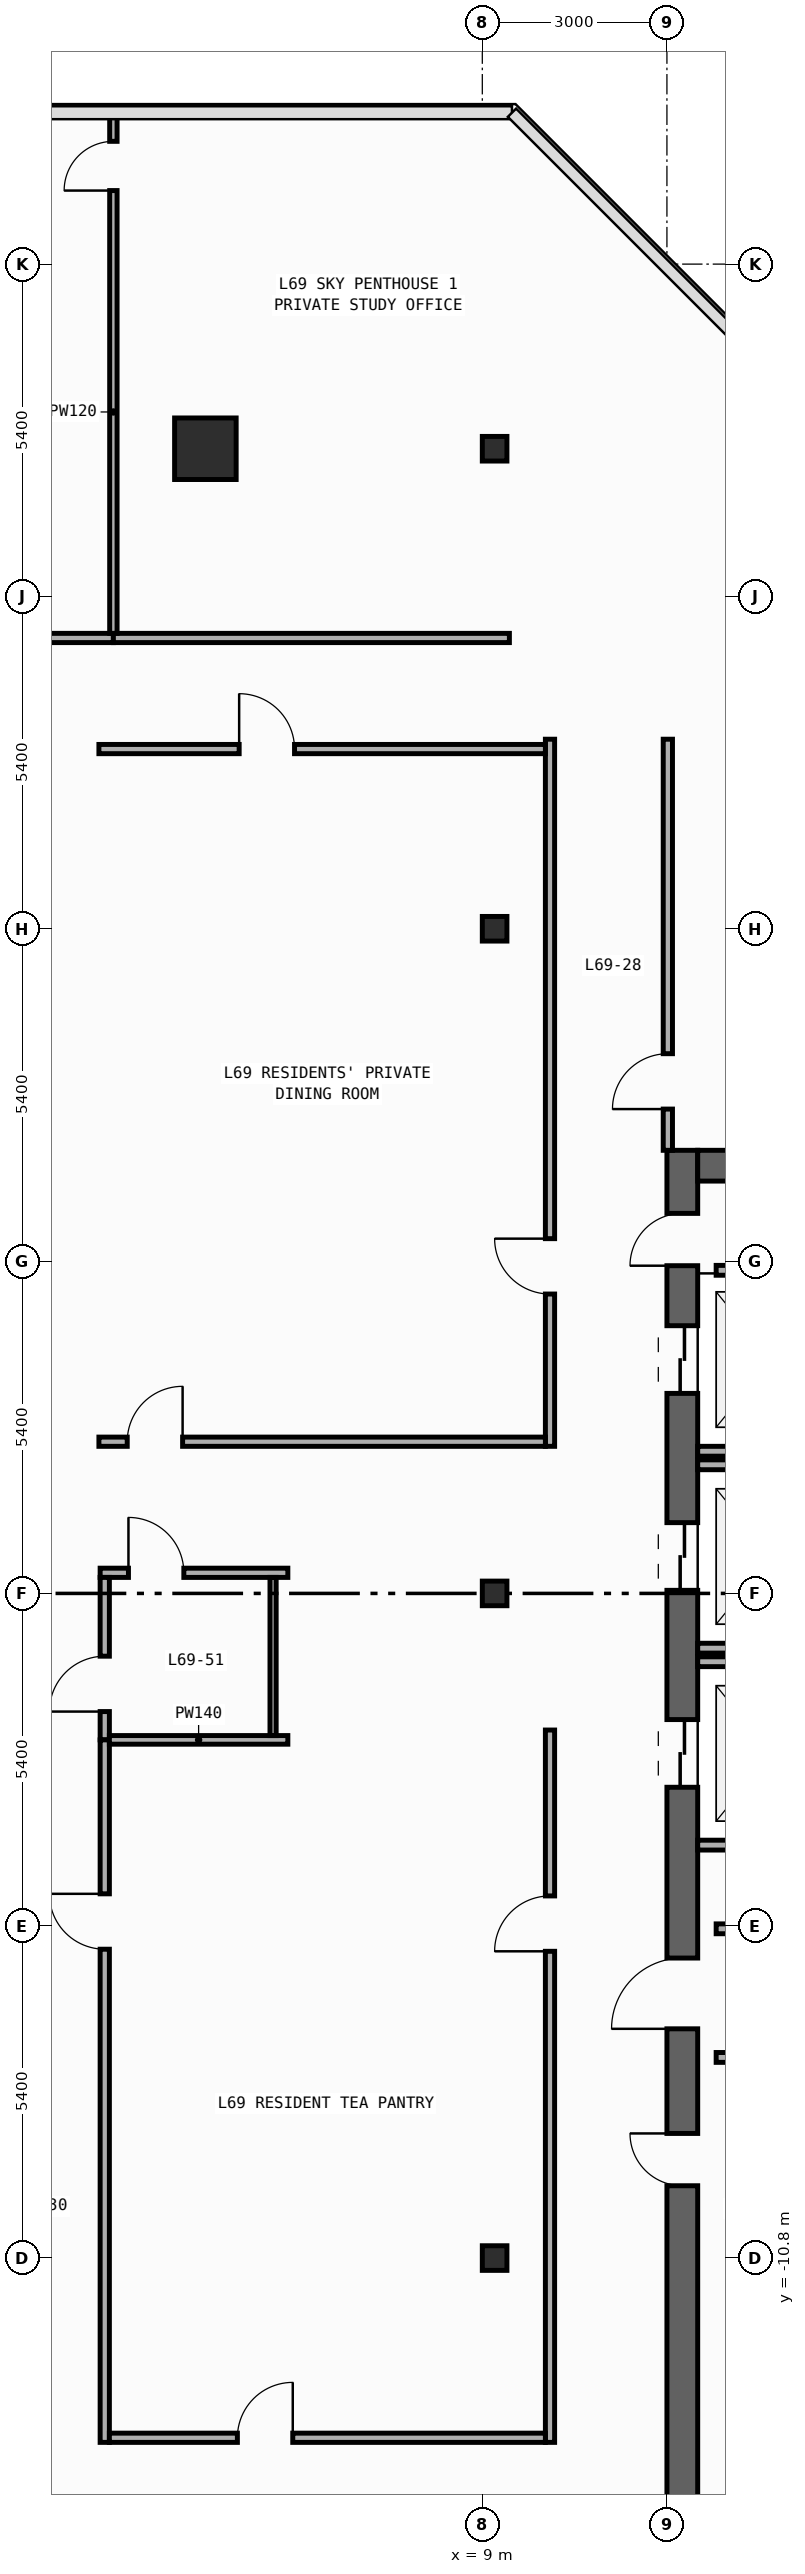
"""IFC4 building model, lengths in metres.
Left out: names, types, materials, properties, quantities, classifications, styles, units other than length and angle.
Written with IfcOpenShell. Run it as: python <this file> out.ifc"""

import sys

from ifc_helpers import new_model, si_unit, direction, frame, frame_2d, origin, origin_2d, place, context, subcontext, project, spatial, rectangle, circle, i_section, extrude, element, fill, save


model = new_model("IFC4")
c1 = context("Model", 3, precision=1e-05, world=origin(), true_north=direction((0.0, 1.0)))
c2 = subcontext(c1, "Body", "Model", "MODEL_VIEW")
j1 = project(units=[si_unit("LENGTHUNIT", "METRE"), si_unit("PLANEANGLEUNIT", "RADIAN")], contexts=[c1])
p1 = place(None, origin())
s1 = spatial("IfcSite", under=j1, at=p1, CompositionType="ELEMENT")
p2 = place(p1, origin())
s2 = spatial("IfcBuilding", under=s1, at=p2, CompositionType="ELEMENT")
p3 = place(p2, frame((0.0, 0.0, 289.0)))
s3 = spatial("IfcBuildingStorey", under=s2, at=p3, CompositionType="ELEMENT", Elevation=289.0)
p4 = place(p3, frame((12.25, -19.8, 0.0), z_axis=(0.0, 0.0, 1.0), x_axis=(0.0, 1.0, 0.0)))
e1 = element("IfcWall", 1, at=p4, inside=s3, PredefinedType="SHEAR", context=c2, shape_type="SweptSolid", body=[
    extrude(rectangle(XDim=27.0, YDim=0.5, at=frame_2d((13.5, 0.0))), origin(), (0.0, 0.0, 1.0), 3.54),
])
p5 = place(p4, frame((23.05, 0.0, 0.0)))
e2 = element("IfcOpeningElement", 2, at=p5, cuts=e1, PredefinedType="OPENING", context=c2, shape_type="SweptSolid", body=[
    extrude(rectangle(XDim=1.1, YDim=2.2, at=frame_2d((0.55, 1.1))), frame((0.0, 0.26, 0.0), z_axis=(0.0, -1.0, 0.0), x_axis=(1.0, 0.0, 0.0)), (0.0, 0.0, 1.0), 0.52),
])
p6 = place(p4, frame((19.85, 0.0, 0.0)))
e3 = element("IfcOpeningElement", 3, at=p6, cuts=e1, PredefinedType="OPENING", context=c2, shape_type="SweptSolid", body=[
    extrude(rectangle(XDim=1.1, YDim=2.2, at=frame_2d((0.55, 1.1))), frame((0.0, 0.26, 0.0), z_axis=(0.0, -1.0, 0.0), x_axis=(1.0, 0.0, 0.0)), (0.0, 0.0, 1.0), 0.52),
])
p7 = place(p4, frame((16.65, 0.0, 0.0)))
e4 = element("IfcOpeningElement", 4, at=p7, cuts=e1, PredefinedType="OPENING", context=c2, shape_type="SweptSolid", body=[
    extrude(rectangle(XDim=1.1, YDim=2.2, at=frame_2d((0.55, 1.1))), frame((0.0, 0.26, 0.0), z_axis=(0.0, -1.0, 0.0), x_axis=(1.0, 0.0, 0.0)), (0.0, 0.0, 1.0), 0.52),
])
p8 = place(p4, frame((10.175, 0.0, 0.0)))
e5 = element("IfcOpeningElement", 5, at=p8, cuts=e1, PredefinedType="OPENING", context=c2, shape_type="SweptSolid", body=[
    extrude(rectangle(XDim=0.85, YDim=2.1, at=frame_2d((0.425, 1.05))), frame((0.0, 0.26, 0.0), z_axis=(0.0, -1.0, 0.0), x_axis=(1.0, 0.0, 0.0)), (0.0, 0.0, 1.0), 0.52),
])
p9 = place(p4, frame((12.725, 0.0, 0.0)))
e6 = element("IfcOpeningElement", 6, at=p9, cuts=e1, PredefinedType="OPENING", context=c2, shape_type="SweptSolid", body=[
    extrude(rectangle(XDim=1.15, YDim=2.2, at=frame_2d((0.575, 1.1))), frame((0.0, 0.26, 0.0), z_axis=(0.0, -1.0, 0.0), x_axis=(1.0, 0.0, 0.0)), (0.0, 0.0, 1.0), 0.52),
])
p10 = place(p4, frame((25.125, 0.0, 0.0)))
e7 = element("IfcOpeningElement", 7, at=p10, cuts=e1, PredefinedType="OPENING", context=c2, shape_type="SweptSolid", body=[
    extrude(rectangle(XDim=0.85, YDim=2.1, at=frame_2d((0.425, 1.05))), frame((0.0, 0.26, 0.0), z_axis=(0.0, -1.0, 0.0), x_axis=(1.0, 0.0, 0.0)), (0.0, 0.0, 1.0), 0.52),
])
p11 = place(p3, frame((12.5, 6.95, 0.0), z_axis=(0.0, 0.0, 1.0), x_axis=(1.0, 0.0, 0.0)))
e8 = element("IfcWall", 8, at=p11, inside=s3, PredefinedType="SHEAR", context=c2, shape_type="SweptSolid", body=[
    extrude(rectangle(XDim=7.4, YDim=0.5, at=frame_2d((3.7, 0.0))), origin(), (0.0, 0.0, 1.0), 3.54),
])
for number, where, z_axis, x_axis in (
    (9, (9.2, -10.8, 0.0), (0.0, 0.0, 1.0), (1.0, 0.0, 0.0)),
    (10, (9.2, 0.0, 0.0), (0.0, 0.0, 1.0), (1.0, 0.0, 0.0)),
    (11, (9.2, 10.8, 0.0), (0.0, 0.0, 1.0), (1.0, 0.0, 0.0)),
    (12, (9.2, 18.6, 0.0), (0.0, 0.0, 1.0), (1.0, 0.0, 0.0)),
):
    element("IfcColumn", number, at=place(p3, frame(where, z_axis=z_axis, x_axis=x_axis)), inside=s3, PredefinedType="COLUMN", context=c2, shape_type="SweptSolid", body=[
        extrude(i_section(OverallWidth=0.4, OverallDepth=0.4, WebThickness=0.013, FlangeThickness=0.021, FilletRadius=0.022, at=origin_2d()), origin(), (0.0, 0.0, 1.0), 3.8),
    ])
p12 = place(p3, frame((4.5, 18.6, 0.0), z_axis=(0.0, 0.0, 1.0), x_axis=(1.0, 0.0, 0.0)))
e13 = element("IfcColumn", 13, at=p12, inside=s3, PredefinedType="COLUMN", context=c2, shape_type="SweptSolid", body=[
    extrude(circle(Radius=0.5, at=origin_2d()), origin(), (0.0, 0.0, 1.0), 3.8),
])
for number, where, z_axis, x_axis in (
    (14, (12.5, 2.31, 0.0), (0.0, 0.0, 1.0), (1.0, 0.0, 0.0)),
    (15, (12.5, -0.89, 0.0), (0.0, 0.0, 1.0), (1.0, 0.0, 0.0)),
    (16, (12.5, 2.09, 0.0), (0.0, 0.0, 1.0), (1.0, 0.0, 0.0)),
    (17, (12.5, -4.09, 0.0), (0.0, 0.0, 1.0), (1.0, 0.0, 0.0)),
    (18, (12.5, -1.11, 0.0), (0.0, 0.0, 1.0), (1.0, 0.0, 0.0)),
):
    element("IfcWall", number, at=place(p3, frame(where, z_axis=z_axis, x_axis=x_axis)), inside=s3, PredefinedType="STANDARD", context=c2, shape_type="SweptSolid", body=[
        extrude(rectangle(XDim=2.49, YDim=0.16, at=frame_2d((1.245, 0.0))), origin(), (0.0, 0.0, 1.0), 3.54),
    ])
for number, where, z_axis, x_axis in (
    (19, (12.8, -5.45, 0.0), (0.0, 0.0, 1.0), (1.0, 0.0, 0.0)),
    (20, (12.8, -7.54, 0.0), (0.0, 0.0, 1.0), (1.0, 0.0, 0.0)),
    (21, (12.8, 5.25, 0.0), (0.0, 0.0, 1.0), (1.0, 0.0, 0.0)),
):
    element("IfcWall", number, at=place(p3, frame(where, z_axis=z_axis, x_axis=x_axis)), inside=s3, PredefinedType="STANDARD", context=c2, shape_type="SweptSolid", body=[
        extrude(rectangle(XDim=2.6, YDim=0.16, at=frame_2d((1.3, 0.0))), origin(), (0.0, 0.0, 1.0), 3.54),
    ])
p13 = place(p3, frame((12.015, 7.2, 0.0), z_axis=(0.0, 0.0, 1.0), x_axis=(0.0, 1.0, 0.0)))
e22 = element("IfcWall", 22, at=p13, inside=s3, PredefinedType="PARTITIONING", context=c2, shape_type="SweptSolid", body=[
    extrude(rectangle(XDim=6.68, YDim=0.15, at=frame_2d((3.34, 0.0))), origin(), (0.0, 0.0, 1.0), 3.54),
])
p14 = place(p13, frame((0.67, 0.0, 0.0)))
e23 = element("IfcOpeningElement", 23, at=p14, cuts=e22, PredefinedType="OPENING", context=c2, shape_type="SweptSolid", body=[
    extrude(rectangle(XDim=0.9, YDim=2.15, at=frame_2d((0.45, 1.075))), frame((0.0, 0.085, 0.0), z_axis=(0.0, -1.0, 0.0), x_axis=(1.0, 0.0, 0.0)), (0.0, 0.0, 1.0), 0.17),
])
p15 = place(p3, frame((10.1, 2.39, 0.0), z_axis=(0.0, 0.0, 1.0), x_axis=(0.0, 1.0, 0.0)))
e24 = element("IfcWall", 24, at=p15, inside=s3, PredefinedType="PARTITIONING", context=c2, shape_type="SweptSolid", body=[
    extrude(rectangle(XDim=11.49, YDim=0.15, at=frame_2d((5.745, 0.0))), origin(), (0.0, 0.0, 1.0), 3.54),
])
p16 = place(p15, frame((2.475, 0.0, 0.0)))
e25 = element("IfcOpeningElement", 25, at=p16, cuts=e24, PredefinedType="OPENING", context=c2, shape_type="SweptSolid", body=[
    extrude(rectangle(XDim=0.9, YDim=2.15, at=frame_2d((0.45, 1.075))), frame((0.0, 0.085, 0.0), z_axis=(0.0, -1.0, 0.0), x_axis=(1.0, 0.0, 0.0)), (0.0, 0.0, 1.0), 0.17),
])
p17 = place(p3, frame((10.1, -13.795, 0.0), z_axis=(0.0, 0.0, 1.0), x_axis=(0.0, 1.0, 0.0)))
e26 = element("IfcWall", 26, at=p17, inside=s3, PredefinedType="PARTITIONING", context=c2, shape_type="SweptSolid", body=[
    extrude(rectangle(XDim=11.575, YDim=0.15, at=frame_2d((5.788, 0.0))), origin(), (0.0, 0.0, 1.0), 3.54),
])
p18 = place(p17, frame((7.979, 0.0, 0.0)))
e27 = element("IfcOpeningElement", 27, at=p18, cuts=e26, PredefinedType="OPENING", context=c2, shape_type="SweptSolid", body=[
    extrude(rectangle(XDim=0.9, YDim=2.15, at=frame_2d((0.45, 1.075))), frame((0.0, 0.085, 0.0), z_axis=(0.0, -1.0, 0.0), x_axis=(1.0, 0.0, 0.0)), (0.0, 0.0, 1.0), 0.17),
])
p19 = place(p3, frame((2.77, 2.465, 0.0), z_axis=(0.0, 0.0, 1.0), x_axis=(1.0, 0.0, 0.0)))
e28 = element("IfcWall", 28, at=p19, inside=s3, PredefinedType="PARTITIONING", context=c2, shape_type="SweptSolid", body=[
    extrude(rectangle(XDim=7.255, YDim=0.15, at=frame_2d((3.627, 0.0))), origin(), (0.0, 0.0, 1.0), 3.54),
])
p20 = place(p19, frame((0.46, 0.0, 0.0)))
e29 = element("IfcOpeningElement", 29, at=p20, cuts=e28, PredefinedType="OPENING", context=c2, shape_type="SweptSolid", body=[
    extrude(rectangle(XDim=0.9, YDim=2.15, at=frame_2d((0.45, 1.075))), frame((0.0, 0.085, 0.0), z_axis=(0.0, -1.0, 0.0), x_axis=(1.0, 0.0, 0.0)), (0.0, 0.0, 1.0), 0.17),
])
p21 = place(p3, frame((2.79, 0.335, 0.0), z_axis=(0.0, 0.0, 1.0), x_axis=(1.0, 0.0, 0.0)))
e30 = element("IfcWall", 30, at=p21, inside=s3, PredefinedType="PARTITIONING", context=c2, shape_type="SweptSolid", body=[
    extrude(rectangle(XDim=3.05, YDim=0.15, at=frame_2d((1.525, 0.0))), origin(), (0.0, 0.0, 1.0), 2.64),
])
p22 = place(p21, frame((0.46, 0.0, 0.0)))
e31 = element("IfcOpeningElement", 31, at=p22, cuts=e30, PredefinedType="OPENING", context=c2, shape_type="SweptSolid", body=[
    extrude(rectangle(XDim=0.9, YDim=2.15, at=frame_2d((0.45, 1.075))), frame((0.0, 0.085, 0.0), z_axis=(0.0, -1.0, 0.0), x_axis=(1.0, 0.0, 0.0)), (0.0, 0.0, 1.0), 0.17),
])
p23 = place(p3, frame((2.865, -2.38, 0.0), z_axis=(0.0, 0.0, 1.0), x_axis=(0.0, 1.0, 0.0)))
e32 = element("IfcWall", 32, at=p23, inside=s3, PredefinedType="PARTITIONING", context=c2, shape_type="SweptSolid", body=[
    extrude(rectangle(XDim=2.64, YDim=0.15, at=frame_2d((1.32, 0.0))), origin(), (0.0, 0.0, 1.0), 3.54),
])
p24 = place(p23, frame((0.46, 0.0, 0.0)))
e33 = element("IfcOpeningElement", 33, at=p24, cuts=e32, PredefinedType="OPENING", context=c2, shape_type="SweptSolid", body=[
    extrude(rectangle(XDim=0.9, YDim=2.15, at=frame_2d((0.45, 1.075))), frame((0.0, 0.085, 0.0), z_axis=(0.0, -1.0, 0.0), x_axis=(1.0, 0.0, 0.0)), (0.0, 0.0, 1.0), 0.17),
])
p25 = place(p3, frame((2.865, -13.795, 0.0), z_axis=(0.0, 0.0, 1.0), x_axis=(0.0, 1.0, 0.0)))
e34 = element("IfcWall", 34, at=p25, inside=s3, PredefinedType="PARTITIONING", context=c2, shape_type="SweptSolid", body=[
    extrude(rectangle(XDim=11.415, YDim=0.15, at=frame_2d((5.708, 0.0))), origin(), (0.0, 0.0, 1.0), 3.54),
])
p26 = place(p25, frame((8.013, 0.0, 0.0)))
e35 = element("IfcOpeningElement", 35, at=p26, cuts=e34, PredefinedType="OPENING", context=c2, shape_type="SweptSolid", body=[
    extrude(rectangle(XDim=0.9, YDim=2.15, at=frame_2d((0.45, 1.075))), frame((0.0, 0.085, 0.0), z_axis=(0.0, -1.0, 0.0), x_axis=(1.0, 0.0, 0.0)), (0.0, 0.0, 1.0), 0.17),
])
p27 = place(p3, frame((-5.21, 15.525, 0.0), z_axis=(0.0, 0.0, 1.0), x_axis=(1.0, 0.0, 0.0)))
e36 = element("IfcWall", 36, at=p27, inside=s3, PredefinedType="PARTITIONING", context=c2, shape_type="SweptSolid", body=[
    extrude(rectangle(XDim=8.215, YDim=0.15, at=frame_2d((4.107, 0.0))), origin(), (0.0, 0.0, 1.0), 3.54),
])
p28 = place(p3, frame((3.005, 15.525, 0.0), z_axis=(0.0, 0.0, 1.0), x_axis=(1.0, 0.0, 0.0)))
e37 = element("IfcWall", 37, at=p28, inside=s3, PredefinedType="PARTITIONING", context=c2, shape_type="SweptSolid", body=[
    extrude(rectangle(XDim=6.435, YDim=0.15, at=frame_2d((3.218, 0.0))), origin(), (0.0, 0.0, 1.0), 3.54),
])
p29 = place(p3, frame((2.77, 13.72, 0.0), z_axis=(0.0, 0.0, 1.0), x_axis=(1.0, 0.0, 0.0)))
e38 = element("IfcWall", 38, at=p29, inside=s3, PredefinedType="PARTITIONING", context=c2, shape_type="SweptSolid", body=[
    extrude(rectangle(XDim=7.255, YDim=0.15, at=frame_2d((3.627, 0.0))), origin(), (0.0, 0.0, 1.0), 3.54),
])
p30 = place(p29, frame((2.279, 0.0, 0.0)))
e39 = element("IfcOpeningElement", 39, at=p30, cuts=e38, PredefinedType="OPENING", context=c2, shape_type="SweptSolid", body=[
    extrude(rectangle(XDim=0.9, YDim=2.15, at=frame_2d((0.45, 1.075))), frame((0.0, 0.085, 0.0), z_axis=(0.0, -1.0, 0.0), x_axis=(1.0, 0.0, 0.0)), (0.0, 0.0, 1.0), 0.17),
])
p31 = place(p3, frame((2.94, -13.72, 0.0), z_axis=(0.0, 0.0, 1.0), x_axis=(1.0, 0.0, 0.0)))
e40 = element("IfcWall", 40, at=p31, inside=s3, PredefinedType="PARTITIONING", context=c2, shape_type="SweptSolid", body=[
    extrude(rectangle(XDim=7.085, YDim=0.15, at=frame_2d((3.542, 0.0))), origin(), (0.0, 0.0, 1.0), 3.54),
])
p32 = place(p31, frame((2.08, 0.0, 0.0)))
e41 = element("IfcOpeningElement", 41, at=p32, cuts=e40, PredefinedType="OPENING", context=c2, shape_type="SweptSolid", body=[
    extrude(rectangle(XDim=0.9, YDim=2.15, at=frame_2d((0.45, 1.075))), frame((0.0, 0.085, 0.0), z_axis=(0.0, -1.0, 0.0), x_axis=(1.0, 0.0, 0.0)), (0.0, 0.0, 1.0), 0.17),
])
p33 = place(p3, frame((3.005, 15.6, 0.0), z_axis=(0.0, 0.0, 1.0), x_axis=(0.0, 1.0, 0.0)))
e42 = element("IfcWall", 42, at=p33, inside=s3, PredefinedType="PARTITIONING", context=c2, shape_type="SweptSolid", body=[
    extrude(rectangle(XDim=8.455, YDim=0.12, at=frame_2d((4.228, 0.0))), origin(), (0.0, 0.0, 1.0), 3.54),
])
p34 = place(p33, frame((7.195, 0.0, 0.0)))
e43 = element("IfcOpeningElement", 43, at=p34, cuts=e42, PredefinedType="OPENING", context=c2, shape_type="SweptSolid", body=[
    extrude(rectangle(XDim=0.8, YDim=2.1, at=frame_2d((0.4, 1.05))), frame((0.0, 0.07, 0.0), z_axis=(0.0, -1.0, 0.0), x_axis=(1.0, 0.0, 0.0)), (0.0, 0.0, 1.0), 0.14),
])
p35 = place(p3, frame((2.94, -2.38, 0.0), z_axis=(0.0, 0.0, 1.0), x_axis=(1.0, 0.0, 0.0)))
e44 = element("IfcWall", 44, at=p35, inside=s3, PredefinedType="PARTITIONING", context=c2, shape_type="SweptSolid", body=[
    extrude(rectangle(XDim=2.9, YDim=0.14, at=frame_2d((1.45, 0.0))), origin(), (0.0, 0.0, 1.0), 3.54),
])
p36 = place(p3, frame((5.6, 0.26, 0.0), z_axis=(0.0, 0.0, 1.0), x_axis=(0.0, -1.0, 0.0)))
e45 = element("IfcWall", 45, at=p36, inside=s3, PredefinedType="PARTITIONING", context=c2, shape_type="SweptSolid", body=[
    extrude(rectangle(XDim=2.57, YDim=0.1, at=frame_2d((1.285, 0.0))), origin(), (0.0, 0.0, 1.0), 3.54),
])
p37 = place(p5, origin())
e46 = element("IfcDoor", 46, at=p37, inside=s3, OperationType="DOUBLE_DOOR_SLIDING", PredefinedType="DOOR", context=c2, shape_type="SweptSolid", body=[
    extrude(rectangle(XDim=1.1, YDim=2.2, at=frame_2d((0.55, 1.1))), frame((0.0, 0.025, 0.0), z_axis=(0.0, -1.0, 0.0), x_axis=(1.0, 0.0, 0.0)), (0.0, 0.0, 1.0), 0.05),
])
fill(e2, e46)
p38 = place(p6, origin())
e47 = element("IfcDoor", 47, at=p38, inside=s3, OperationType="DOUBLE_DOOR_SLIDING", PredefinedType="DOOR", context=c2, shape_type="SweptSolid", body=[
    extrude(rectangle(XDim=1.1, YDim=2.2, at=frame_2d((0.55, 1.1))), frame((0.0, 0.025, 0.0), z_axis=(0.0, -1.0, 0.0), x_axis=(1.0, 0.0, 0.0)), (0.0, 0.0, 1.0), 0.05),
])
fill(e3, e47)
p39 = place(p7, origin())
e48 = element("IfcDoor", 48, at=p39, inside=s3, OperationType="DOUBLE_DOOR_SLIDING", PredefinedType="DOOR", context=c2, shape_type="SweptSolid", body=[
    extrude(rectangle(XDim=1.1, YDim=2.2, at=frame_2d((0.55, 1.1))), frame((0.0, 0.025, 0.0), z_axis=(0.0, -1.0, 0.0), x_axis=(1.0, 0.0, 0.0)), (0.0, 0.0, 1.0), 0.05),
])
fill(e4, e48)
p40 = place(p8, origin())
e49 = element("IfcDoor", 49, at=p40, inside=s3, OperationType="SINGLE_SWING_RIGHT", PredefinedType="DOOR", context=c2, shape_type="SweptSolid", body=[
    extrude(rectangle(XDim=0.85, YDim=2.1, at=frame_2d((0.425, 1.05))), frame((0.0, 0.025, 0.0), z_axis=(0.0, -1.0, 0.0), x_axis=(1.0, 0.0, 0.0)), (0.0, 0.0, 1.0), 0.05),
])
fill(e5, e49)
p41 = place(p9, origin())
e50 = element("IfcDoor", 50, at=p41, inside=s3, OperationType="SINGLE_SWING_LEFT", PredefinedType="DOOR", context=c2, shape_type="SweptSolid", body=[
    extrude(rectangle(XDim=1.15, YDim=2.2, at=frame_2d((0.575, 1.1))), frame((0.0, 0.025, 0.0), z_axis=(0.0, -1.0, 0.0), x_axis=(1.0, 0.0, 0.0)), (0.0, 0.0, 1.0), 0.05),
])
fill(e6, e50)
p42 = place(p10, origin())
e51 = element("IfcDoor", 51, at=p42, inside=s3, OperationType="SINGLE_SWING_LEFT", PredefinedType="DOOR", context=c2, shape_type="SweptSolid", body=[
    extrude(rectangle(XDim=0.85, YDim=2.1, at=frame_2d((0.425, 1.05))), frame((0.0, 0.025, 0.0), z_axis=(0.0, -1.0, 0.0), x_axis=(1.0, 0.0, 0.0)), (0.0, 0.0, 1.0), 0.05),
])
fill(e7, e51)
p43 = place(p14, origin())
e52 = element("IfcDoor", 52, at=p43, inside=s3, OperationType="SINGLE_SWING_LEFT", PredefinedType="DOOR", context=c2, shape_type="SweptSolid", body=[
    extrude(rectangle(XDim=0.9, YDim=2.15, at=frame_2d((0.45, 1.075))), frame((0.0, 0.025, 0.0), z_axis=(0.0, -1.0, 0.0), x_axis=(1.0, 0.0, 0.0)), (0.0, 0.0, 1.0), 0.05),
])
fill(e23, e52)
p44 = place(p16, origin())
e53 = element("IfcDoor", 53, at=p44, inside=s3, OperationType="SINGLE_SWING_RIGHT", PredefinedType="DOOR", context=c2, shape_type="SweptSolid", body=[
    extrude(rectangle(XDim=0.9, YDim=2.15, at=frame_2d((0.45, 1.075))), frame((0.0, 0.025, 0.0), z_axis=(0.0, -1.0, 0.0), x_axis=(1.0, 0.0, 0.0)), (0.0, 0.0, 1.0), 0.05),
])
fill(e25, e53)
p45 = place(p18, origin())
e54 = element("IfcDoor", 54, at=p45, inside=s3, OperationType="SINGLE_SWING_LEFT", PredefinedType="DOOR", context=c2, shape_type="SweptSolid", body=[
    extrude(rectangle(XDim=0.9, YDim=2.15, at=frame_2d((0.45, 1.075))), frame((0.0, 0.025, 0.0), z_axis=(0.0, -1.0, 0.0), x_axis=(1.0, 0.0, 0.0)), (0.0, 0.0, 1.0), 0.05),
])
fill(e27, e54)
p46 = place(p20, origin())
e55 = element("IfcDoor", 55, at=p46, inside=s3, OperationType="SINGLE_SWING_RIGHT", PredefinedType="DOOR", context=c2, shape_type="SweptSolid", body=[
    extrude(rectangle(XDim=0.9, YDim=2.15, at=frame_2d((0.45, 1.075))), frame((0.0, 0.025, 0.0), z_axis=(0.0, -1.0, 0.0), x_axis=(1.0, 0.0, 0.0)), (0.0, 0.0, 1.0), 0.05),
])
fill(e29, e55)
p47 = place(p22, origin())
e56 = element("IfcDoor", 56, at=p47, inside=s3, OperationType="SINGLE_SWING_LEFT", PredefinedType="DOOR", context=c2, shape_type="SweptSolid", body=[
    extrude(rectangle(XDim=0.9, YDim=2.15, at=frame_2d((0.45, 1.075))), frame((0.0, 0.025, 0.0), z_axis=(0.0, -1.0, 0.0), x_axis=(1.0, 0.0, 0.0)), (0.0, 0.0, 1.0), 0.05),
])
fill(e31, e56)
p48 = place(p24, origin())
e57 = element("IfcDoor", 57, at=p48, inside=s3, OperationType="SINGLE_SWING_LEFT", PredefinedType="DOOR", context=c2, shape_type="SweptSolid", body=[
    extrude(rectangle(XDim=0.9, YDim=2.15, at=frame_2d((0.45, 1.075))), frame((0.0, 0.025, 0.0), z_axis=(0.0, -1.0, 0.0), x_axis=(1.0, 0.0, 0.0)), (0.0, 0.0, 1.0), 0.05),
])
fill(e33, e57)
p49 = place(p26, origin())
e58 = element("IfcDoor", 58, at=p49, inside=s3, OperationType="SINGLE_SWING_RIGHT", PredefinedType="DOOR", context=c2, shape_type="SweptSolid", body=[
    extrude(rectangle(XDim=0.9, YDim=2.15, at=frame_2d((0.45, 1.075))), frame((0.0, 0.025, 0.0), z_axis=(0.0, -1.0, 0.0), x_axis=(1.0, 0.0, 0.0)), (0.0, 0.0, 1.0), 0.05),
])
fill(e35, e58)
p50 = place(p30, origin())
e59 = element("IfcDoor", 59, at=p50, inside=s3, OperationType="SINGLE_SWING_LEFT", PredefinedType="DOOR", context=c2, shape_type="SweptSolid", body=[
    extrude(rectangle(XDim=0.9, YDim=2.15, at=frame_2d((0.45, 1.075))), frame((0.0, 0.025, 0.0), z_axis=(0.0, -1.0, 0.0), x_axis=(1.0, 0.0, 0.0)), (0.0, 0.0, 1.0), 0.05),
])
fill(e39, e59)
p51 = place(p32, origin())
e60 = element("IfcDoor", 60, at=p51, inside=s3, OperationType="SINGLE_SWING_RIGHT", PredefinedType="DOOR", context=c2, shape_type="SweptSolid", body=[
    extrude(rectangle(XDim=0.9, YDim=2.15, at=frame_2d((0.45, 1.075))), frame((0.0, 0.025, 0.0), z_axis=(0.0, -1.0, 0.0), x_axis=(1.0, 0.0, 0.0)), (0.0, 0.0, 1.0), 0.05),
])
fill(e41, e60)
p52 = place(p34, origin())
e61 = element("IfcDoor", 61, at=p52, inside=s3, OperationType="SINGLE_SWING_LEFT", PredefinedType="DOOR", context=c2, shape_type="SweptSolid", body=[
    extrude(rectangle(XDim=0.8, YDim=2.1, at=frame_2d((0.4, 1.05))), frame((0.0, 0.025, 0.0), z_axis=(0.0, -1.0, 0.0), x_axis=(1.0, 0.0, 0.0)), (0.0, 0.0, 1.0), 0.05),
])
fill(e43, e61)
save(model, sys.argv[1])
